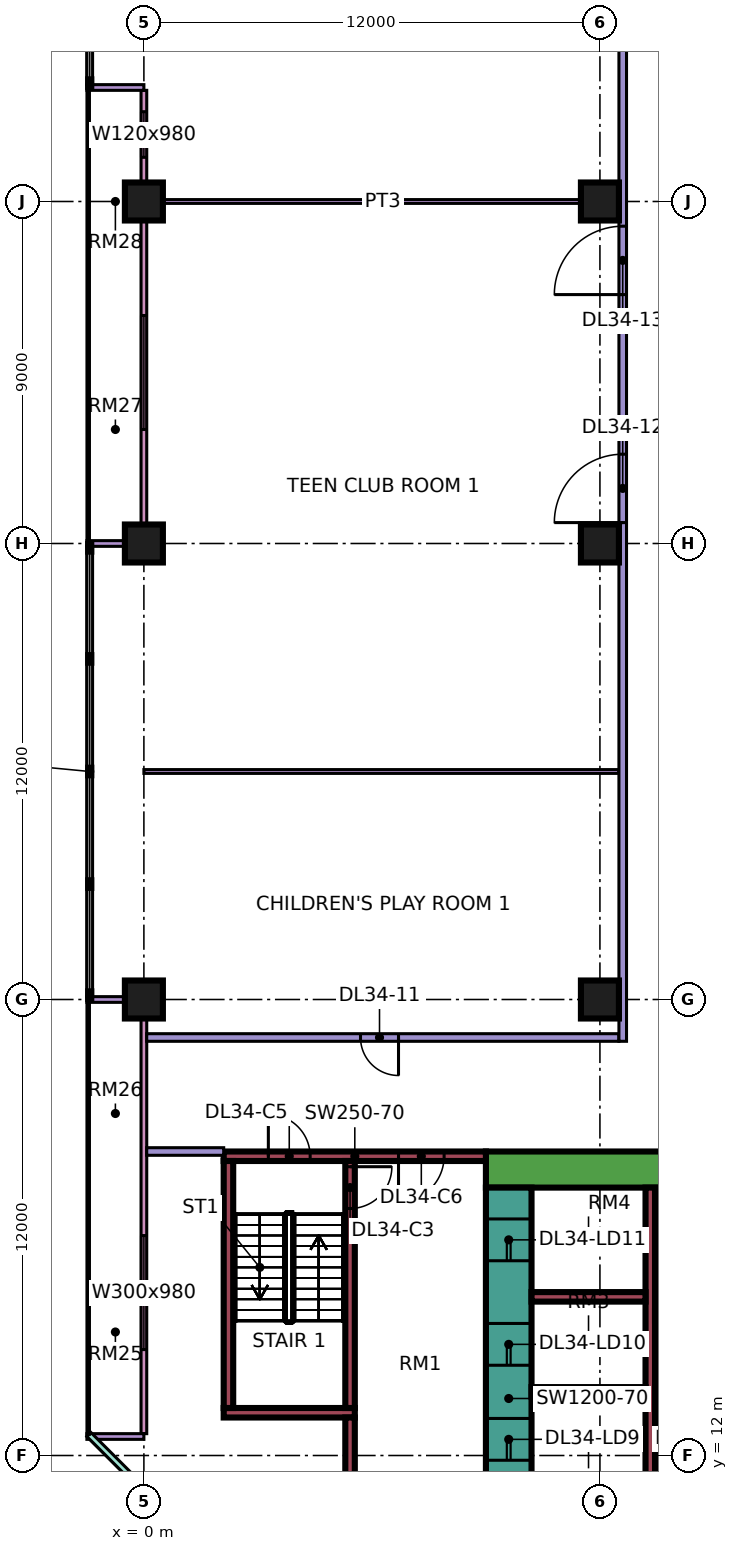
"""IFC4 building model, lengths in metres.
Left out: names, types, materials, properties, quantities, classifications, styles, units other than length and angle.
Written with IfcOpenShell. Run it as: python <this file> out.ifc"""

import sys

from ifc_helpers import new_model, si_unit, direction, frame, frame_2d, origin, origin_2d, place, context, subcontext, project, spatial, rectangle, extrude, element, fill, save


model = new_model("IFC4")
c1 = context("Model", 3, precision=1e-05, world=origin(), true_north=direction((0.0, 1.0)))
c2 = subcontext(c1, "Body", "Model", "MODEL_VIEW")
j1 = project(units=[si_unit("LENGTHUNIT", "METRE"), si_unit("PLANEANGLEUNIT", "RADIAN")], contexts=[c1])
p1 = place(None, origin())
s1 = spatial("IfcSite", under=j1, at=p1, CompositionType="ELEMENT")
p2 = place(p1, origin())
s2 = spatial("IfcBuilding", under=s1, at=p2, CompositionType="ELEMENT")
p3 = place(p2, frame((0.0, 0.0, 146.15)))
s3 = spatial("IfcBuildingStorey", under=s2, at=p3, CompositionType="ELEMENT", Elevation=146.15)
for number, where, z_axis, x_axis in (
    (1, (0.0, 24.0, 0.0), (0.0, 0.0, 1.0), (1.0, 0.0, 0.0)),
    (2, (0.0, 36.0, 0.0), (0.0, 0.0, 1.0), (1.0, 0.0, 0.0)),
    (3, (0.0, 45.0, 0.0), (0.0, 0.0, 1.0), (1.0, 0.0, 0.0)),
    (4, (12.0, 24.0, 0.0), (0.0, 0.0, 1.0), (1.0, 0.0, 0.0)),
    (5, (12.0, 36.0, 0.0), (0.0, 0.0, 1.0), (1.0, 0.0, 0.0)),
    (6, (12.0, 45.0, 0.0), (0.0, 0.0, 1.0), (1.0, 0.0, 0.0)),
):
    element("IfcColumn", number, at=place(p3, frame(where, z_axis=z_axis, x_axis=x_axis)), inside=s3, PredefinedType="COLUMN", context=c2, shape_type="SweptSolid", body=[
        extrude(rectangle(XDim=1.0, YDim=1.0, at=origin_2d()), origin(), (0.0, 0.0, 1.0), 11.25),
    ])
p4 = place(p3, frame((9.0, 19.525, 0.0), z_axis=(0.0, 0.0, 1.0), x_axis=(1.0, 0.0, 0.0)))
e7 = element("IfcWall", 7, at=p4, inside=s3, PredefinedType="SHEAR", context=c2, shape_type="SweptSolid", body=[
    extrude(rectangle(XDim=25.0, YDim=0.95, at=frame_2d((12.5, 0.0))), origin(), (0.0, 0.0, 1.0), 11.25),
])
p5 = place(p4, frame((19.1, 0.0, 0.0)))
e8 = element("IfcOpeningElement", 8, at=p5, cuts=e7, PredefinedType="OPENING", context=c2, shape_type="SweptSolid", body=[
    extrude(rectangle(XDim=1.8, YDim=2.4, at=frame_2d((0.9, 1.2))), frame((0.0, 0.485, 0.0), z_axis=(0.0, -1.0, 0.0), x_axis=(1.0, 0.0, 0.0)), (0.0, 0.0, 1.0), 0.97),
])
p6 = place(p3, frame((9.6, 7.95, 0.0), z_axis=(0.0, 0.0, 1.0), x_axis=(0.0, 1.0, 0.0)))
e9 = element("IfcWall", 9, at=p6, inside=s3, PredefinedType="SHEAR", context=c2, shape_type="SweptSolid", body=[
    extrude(rectangle(XDim=11.1, YDim=1.2, at=frame_2d((5.55, 0.0))), origin(), (0.0, 0.0, 1.0), 11.25),
])
p7 = place(p6, frame((3.925, 0.0, 0.0)))
e10 = element("IfcOpeningElement", 10, at=p7, cuts=e9, PredefinedType="OPENING", context=c2, shape_type="SweptSolid", body=[
    extrude(rectangle(XDim=1.1, YDim=2.2, at=frame_2d((0.55, 1.1))), frame((0.0, 0.61, 0.0), z_axis=(0.0, -1.0, 0.0), x_axis=(1.0, 0.0, 0.0)), (0.0, 0.0, 1.0), 1.22),
])
p8 = place(p6, frame((6.425, 0.0, 0.0)))
e11 = element("IfcOpeningElement", 11, at=p8, cuts=e9, PredefinedType="OPENING", context=c2, shape_type="SweptSolid", body=[
    extrude(rectangle(XDim=1.1, YDim=2.2, at=frame_2d((0.55, 1.1))), frame((0.0, 0.61, 0.0), z_axis=(0.0, -1.0, 0.0), x_axis=(1.0, 0.0, 0.0)), (0.0, 0.0, 1.0), 1.22),
])
p9 = place(p6, frame((9.175, 0.0, 0.0)))
e12 = element("IfcOpeningElement", 12, at=p9, cuts=e9, PredefinedType="OPENING", context=c2, shape_type="SweptSolid", body=[
    extrude(rectangle(XDim=1.1, YDim=2.2, at=frame_2d((0.55, 1.1))), frame((0.0, 0.61, 0.0), z_axis=(0.0, -1.0, 0.0), x_axis=(1.0, 0.0, 0.0)), (0.0, 0.0, 1.0), 1.22),
])
p10 = place(p6, frame((1.6, 0.0, 0.0)))
e13 = element("IfcOpeningElement", 13, at=p10, cuts=e9, PredefinedType="OPENING", context=c2, shape_type="SweptSolid", body=[
    extrude(rectangle(XDim=0.9, YDim=2.1, at=frame_2d((0.45, 1.05))), frame((0.0, 0.61, 0.0), z_axis=(0.0, -1.0, 0.0), x_axis=(1.0, 0.0, 0.0)), (0.0, 0.0, 1.0), 1.22),
])
p11 = place(p3, frame((13.325, 7.95, 0.0), z_axis=(0.0, 0.0, 1.0), x_axis=(0.0, 1.0, 0.0)))
e14 = element("IfcWall", 14, at=p11, inside=s3, PredefinedType="SHEAR", context=c2, shape_type="SweptSolid", body=[
    extrude(rectangle(XDim=11.1, YDim=0.25, at=frame_2d((5.55, 0.0))), origin(), (0.0, 0.0, 1.0), 11.25),
])
p12 = place(p3, frame((13.45, 15.675, 0.0), z_axis=(0.0, 0.0, 1.0), x_axis=(1.0, 0.0, 0.0)))
e15 = element("IfcWall", 15, at=p12, inside=s3, PredefinedType="SHEAR", context=c2, shape_type="SweptSolid", body=[
    extrude(rectangle(XDim=13.75, YDim=0.25, at=frame_2d((6.875, 0.0))), origin(), (0.0, 0.0, 1.0), 11.25),
])
p13 = place(p12, frame((11.65, 0.0, 0.0)))
e16 = element("IfcOpeningElement", 16, at=p13, cuts=e15, PredefinedType="OPENING", context=c2, shape_type="SweptSolid", body=[
    extrude(rectangle(XDim=1.2, YDim=2.2, at=frame_2d((0.6, 1.1))), frame((0.0, 0.135, 0.0), z_axis=(0.0, -1.0, 0.0), x_axis=(1.0, 0.0, 0.0)), (0.0, 0.0, 1.0), 0.27),
])
for number, where, z_axis, x_axis in (
    (17, (10.2, 13.675, 0.0), (0.0, 0.0, 1.0), (1.0, 0.0, 0.0)),
    (18, (10.2, 16.175, 0.0), (0.0, 0.0, 1.0), (1.0, 0.0, 0.0)),
):
    element("IfcWall", number, at=place(p3, frame(where, z_axis=z_axis, x_axis=x_axis)), inside=s3, PredefinedType="SHEAR", context=c2, shape_type="SweptSolid", body=[
        extrude(rectangle(XDim=3.0, YDim=0.25, at=frame_2d((1.5, 0.0))), origin(), (0.0, 0.0, 1.0), 11.25),
    ])
p14 = place(p3, frame((2.1, 19.875, 0.0), z_axis=(0.0, 0.0, 1.0), x_axis=(1.0, 0.0, 0.0)))
e19 = element("IfcWall", 19, at=p14, inside=s3, PredefinedType="SHEAR", context=c2, shape_type="SweptSolid", body=[
    extrude(rectangle(XDim=6.9, YDim=0.25, at=frame_2d((3.45, 0.0))), origin(), (0.0, 0.0, 1.0), 11.25),
])
p15 = place(p14, frame((1.175, 0.0, 0.0)))
e20 = element("IfcOpeningElement", 20, at=p15, cuts=e19, PredefinedType="OPENING", context=c2, shape_type="SweptSolid", body=[
    extrude(rectangle(XDim=1.1, YDim=2.2, at=frame_2d((0.55, 1.1))), frame((0.0, 0.135, 0.0), z_axis=(0.0, -1.0, 0.0), x_axis=(1.0, 0.0, 0.0)), (0.0, 0.0, 1.0), 0.27),
])
p16 = place(p14, frame((4.6, 0.0, 0.0)))
e21 = element("IfcOpeningElement", 21, at=p16, cuts=e19, PredefinedType="OPENING", context=c2, shape_type="SweptSolid", body=[
    extrude(rectangle(XDim=1.2, YDim=2.2, at=frame_2d((0.6, 1.1))), frame((0.0, 0.135, 0.0), z_axis=(0.0, -1.0, 0.0), x_axis=(1.0, 0.0, 0.0)), (0.0, 0.0, 1.0), 0.27),
])
p17 = place(p3, frame((2.1, 13.125, 0.0), z_axis=(0.0, 0.0, 1.0), x_axis=(1.0, 0.0, 0.0)))
e22 = element("IfcWall", 22, at=p17, inside=s3, PredefinedType="SHEAR", context=c2, shape_type="SweptSolid", body=[
    extrude(rectangle(XDim=3.45, YDim=0.25, at=frame_2d((1.725, 0.0))), origin(), (0.0, 0.0, 1.0), 11.25),
])
p18 = place(p3, frame((2.225, 13.25, 0.0), z_axis=(0.0, 0.0, 1.0), x_axis=(0.0, 1.0, 0.0)))
e23 = element("IfcWall", 23, at=p18, inside=s3, PredefinedType="SHEAR", context=c2, shape_type="SweptSolid", body=[
    extrude(rectangle(XDim=6.5, YDim=0.25, at=frame_2d((3.25, 0.0))), origin(), (0.0, 0.0, 1.0), 11.25),
])
p19 = place(p3, frame((5.425, 13.25, 0.0), z_axis=(0.0, 0.0, 1.0), x_axis=(0.0, 1.0, 0.0)))
e24 = element("IfcWall", 24, at=p19, inside=s3, PredefinedType="SHEAR", context=c2, shape_type="SweptSolid", body=[
    extrude(rectangle(XDim=6.5, YDim=0.25, at=frame_2d((3.25, 0.0))), origin(), (0.0, 0.0, 1.0), 11.25),
])
p20 = place(p19, frame((5.25, 0.0, 0.0)))
e25 = element("IfcOpeningElement", 25, at=p20, cuts=e24, PredefinedType="OPENING", context=c2, shape_type="SweptSolid", body=[
    extrude(rectangle(XDim=1.1, YDim=2.2, at=frame_2d((0.55, 1.1))), frame((0.0, 0.135, 0.0), z_axis=(0.0, -1.0, 0.0), x_axis=(1.0, 0.0, 0.0)), (0.0, 0.0, 1.0), 0.27),
])
p21 = place(p3, frame((5.425, 9.0, 0.0), z_axis=(0.0, 0.0, 1.0), x_axis=(0.0, 1.0, 0.0)))
e26 = element("IfcWall", 26, at=p21, inside=s3, PredefinedType="SHEAR", context=c2, shape_type="SweptSolid", body=[
    extrude(rectangle(XDim=4.0, YDim=0.25, at=frame_2d((2.0, 0.0))), origin(), (0.0, 0.0, 1.0), 11.25),
])
p22 = place(p3, frame((0.0, 47.925, 0.0), z_axis=(0.0, 0.0, 1.0), x_axis=(0.0, -1.0, 0.0)))
e27 = element("IfcWall", 27, at=p22, inside=s3, PredefinedType="SOLIDWALL", context=c2, shape_type="SweptSolid", body=[
    extrude(rectangle(XDim=11.85, YDim=0.15, at=frame_2d((5.925, 0.0))), origin(), (0.0, 0.0, 1.0), 10.85),
])
p23 = place(p22, frame((0.562, 0.0, 0.45)))
e28 = element("IfcOpeningElement", 28, at=p23, cuts=e27, PredefinedType="OPENING", context=c2, shape_type="SweptSolid", body=[
    extrude(rectangle(XDim=1.2, YDim=9.8, at=frame_2d((0.6, 4.9))), frame((0.0, 0.085, 0.0), z_axis=(0.0, -1.0, 0.0), x_axis=(1.0, 0.0, 0.0)), (0.0, 0.0, 1.0), 0.17),
])
p24 = place(p22, frame((5.925, 0.0, 0.45)))
e29 = element("IfcOpeningElement", 29, at=p24, cuts=e27, PredefinedType="OPENING", context=c2, shape_type="SweptSolid", body=[
    extrude(rectangle(XDim=3.0, YDim=9.8, at=frame_2d((1.5, 4.9))), frame((0.0, 0.085, 0.0), z_axis=(0.0, -1.0, 0.0), x_axis=(1.0, 0.0, 0.0)), (0.0, 0.0, 1.0), 0.17),
])
for number, where, z_axis, x_axis in (
    (30, (-1.5, 48.0, 0.0), (0.0, 0.0, 1.0), (1.0, 0.0, 0.0)),
    (31, (-1.5, 36.0, 0.0), (0.0, 0.0, 1.0), (1.0, 0.0, 0.0)),
):
    element("IfcWall", number, at=place(p3, frame(where, z_axis=z_axis, x_axis=x_axis)), inside=s3, PredefinedType="SOLIDWALL", context=c2, shape_type="SweptSolid", body=[
        extrude(rectangle(XDim=1.5, YDim=0.15, at=frame_2d((0.75, 0.0))), origin(), (0.0, 0.0, 1.0), 10.85),
    ])
p25 = place(p3, frame((0.0, 23.925, 0.0), z_axis=(0.0, 0.0, 1.0), x_axis=(0.0, -1.0, 0.0)))
e32 = element("IfcWall", 32, at=p25, inside=s3, PredefinedType="SOLIDWALL", context=c2, shape_type="SweptSolid", body=[
    extrude(rectangle(XDim=11.35, YDim=0.15, at=frame_2d((5.675, 0.0))), origin(), (0.0, 0.0, 1.0), 10.85),
])
p26 = place(p25, frame((6.137, 0.0, 0.45)))
e33 = element("IfcOpeningElement", 33, at=p26, cuts=e32, PredefinedType="OPENING", context=c2, shape_type="SweptSolid", body=[
    extrude(rectangle(XDim=3.0, YDim=9.8, at=frame_2d((1.5, 4.9))), frame((0.0, 0.085, 0.0), z_axis=(0.0, -1.0, 0.0), x_axis=(1.0, 0.0, 0.0)), (0.0, 0.0, 1.0), 0.17),
])
for number, where, z_axis, x_axis in (
    (34, (-1.5, 24.0, 0.0), (0.0, 0.0, 1.0), (1.0, 0.0, 0.0)),
    (35, (-1.5, 12.5, 0.0), (0.0, 0.0, 1.0), (1.0, 0.0, 0.0)),
):
    element("IfcWall", number, at=place(p3, frame(where, z_axis=z_axis, x_axis=x_axis)), inside=s3, PredefinedType="SOLIDWALL", context=c2, shape_type="SweptSolid", body=[
        extrude(rectangle(XDim=1.5, YDim=0.15, at=frame_2d((0.75, 0.0))), origin(), (0.0, 0.0, 1.0), 10.85),
    ])
p27 = place(p3, frame((-1.447, 12.553, 0.0), z_axis=(0.0, 0.0, 1.0), x_axis=(0.707106781187, -0.707106781187, 0.0)))
e36 = element("IfcWall", 36, at=p27, inside=s3, PredefinedType="SOLIDWALL", context=c2, shape_type="SweptSolid", body=[
    extrude(rectangle(XDim=19.799, YDim=0.15, at=frame_2d((9.899, 0.0))), origin(), (0.0, 0.0, 1.0), 10.85),
])
p28 = place(p27, frame((8.399, 0.0, 0.45)))
e37 = element("IfcOpeningElement", 37, at=p28, cuts=e36, PredefinedType="OPENING", context=c2, shape_type="SweptSolid", body=[
    extrude(rectangle(XDim=3.0, YDim=9.8, at=frame_2d((1.5, 4.9))), frame((0.0, 0.085, 0.0), z_axis=(0.0, -1.0, 0.0), x_axis=(1.0, 0.0, 0.0)), (0.0, 0.0, 1.0), 0.17),
])
p29 = place(p3, frame((0.0, 30.0, 0.0), z_axis=(0.0, 0.0, 1.0), x_axis=(1.0, 0.0, 0.0)))
e38 = element("IfcWall", 38, at=p29, inside=s3, PredefinedType="PARTITIONING", context=c2, shape_type="SweptSolid", body=[
    extrude(rectangle(XDim=12.5, YDim=0.1, at=frame_2d((6.25, 0.0))), origin(), (0.0, 0.0, 1.0), 10.85),
])
p30 = place(p3, frame((0.074, 20.0, 0.0), z_axis=(0.0, 0.0, 1.0), x_axis=(1.0, 0.0, 0.0)))
e39 = element("IfcWall", 39, at=p30, inside=s3, PredefinedType="PARTITIONING", context=c2, shape_type="SweptSolid", body=[
    extrude(rectangle(XDim=2.026, YDim=0.2, at=frame_2d((1.013, 0.0))), origin(), (0.0, 0.0, 1.0), 10.85),
])
p31 = place(p3, frame((0.074, 23.0, 0.0), z_axis=(0.0, 0.0, 1.0), x_axis=(1.0, 0.0, 0.0)))
e40 = element("IfcWall", 40, at=p31, inside=s3, PredefinedType="PARTITIONING", context=c2, shape_type="SweptSolid", body=[
    extrude(rectangle(XDim=12.426, YDim=0.2, at=frame_2d((6.213, 0.0))), origin(), (0.0, 0.0, 1.0), 10.85),
])
p32 = place(p31, frame((5.626, 0.0, 0.0)))
e41 = element("IfcOpeningElement", 41, at=p32, cuts=e40, PredefinedType="OPENING", context=c2, shape_type="SweptSolid", body=[
    extrude(rectangle(XDim=1.0, YDim=2.1, at=frame_2d((0.5, 1.05))), frame((0.0, 0.11, 0.0), z_axis=(0.0, -1.0, 0.0), x_axis=(1.0, 0.0, 0.0)), (0.0, 0.0, 1.0), 0.22),
])
p33 = place(p3, frame((0.074, 45.0, 0.0), z_axis=(0.0, 0.0, 1.0), x_axis=(1.0, 0.0, 0.0)))
e42 = element("IfcWall", 42, at=p33, inside=s3, PredefinedType="PARTITIONING", context=c2, shape_type="SweptSolid", body=[
    extrude(rectangle(XDim=12.426, YDim=0.1, at=frame_2d((6.213, 0.0))), origin(), (0.0, 0.0, 1.0), 10.85),
])
p34 = place(p3, frame((12.6, 22.9, 0.0), z_axis=(0.0, 0.0, 1.0), x_axis=(0.0, 1.0, 0.0)))
e43 = element("IfcWall", 43, at=p34, inside=s3, PredefinedType="PARTITIONING", context=c2, shape_type="SweptSolid", body=[
    extrude(rectangle(XDim=40.026, YDim=0.2, at=frame_2d((20.013, 0.0))), origin(), (0.0, 0.0, 1.0), 10.85),
])
p35 = place(p34, frame((13.65, 0.0, 0.0)))
e44 = element("IfcOpeningElement", 44, at=p35, cuts=e43, PredefinedType="OPENING", context=c2, shape_type="SweptSolid", body=[
    extrude(rectangle(XDim=1.8, YDim=2.1, at=frame_2d((0.9, 1.05))), frame((0.0, 0.11, 0.0), z_axis=(0.0, -1.0, 0.0), x_axis=(1.0, 0.0, 0.0)), (0.0, 0.0, 1.0), 0.22),
])
p36 = place(p34, frame((19.65, 0.0, 0.0)))
e45 = element("IfcOpeningElement", 45, at=p36, cuts=e43, PredefinedType="OPENING", context=c2, shape_type="SweptSolid", body=[
    extrude(rectangle(XDim=1.8, YDim=2.1, at=frame_2d((0.9, 1.05))), frame((0.0, 0.11, 0.0), z_axis=(0.0, -1.0, 0.0), x_axis=(1.0, 0.0, 0.0)), (0.0, 0.0, 1.0), 0.22),
])
p37 = place(p34, frame((26.2, 0.0, 0.0)))
e46 = element("IfcOpeningElement", 46, at=p37, cuts=e43, PredefinedType="OPENING", context=c2, shape_type="SweptSolid", body=[
    extrude(rectangle(XDim=1.0, YDim=2.1, at=frame_2d((0.5, 1.05))), frame((0.0, 0.11, 0.0), z_axis=(0.0, -1.0, 0.0), x_axis=(1.0, 0.0, 0.0)), (0.0, 0.0, 1.0), 0.22),
])
p38 = place(p34, frame((29.45, 0.0, 0.0)))
e47 = element("IfcOpeningElement", 47, at=p38, cuts=e43, PredefinedType="OPENING", context=c2, shape_type="SweptSolid", body=[
    extrude(rectangle(XDim=1.0, YDim=2.1, at=frame_2d((0.5, 1.05))), frame((0.0, 0.11, 0.0), z_axis=(0.0, -1.0, 0.0), x_axis=(1.0, 0.0, 0.0)), (0.0, 0.0, 1.0), 0.22),
])
p39 = place(p34, frame((35.2, 0.0, 0.0)))
e48 = element("IfcOpeningElement", 48, at=p39, cuts=e43, PredefinedType="OPENING", context=c2, shape_type="SweptSolid", body=[
    extrude(rectangle(XDim=1.0, YDim=2.1, at=frame_2d((0.5, 1.05))), frame((0.0, 0.11, 0.0), z_axis=(0.0, -1.0, 0.0), x_axis=(1.0, 0.0, 0.0)), (0.0, 0.0, 1.0), 0.22),
])
p40 = place(p34, frame((38.45, 0.0, 0.0)))
e49 = element("IfcOpeningElement", 49, at=p40, cuts=e43, PredefinedType="OPENING", context=c2, shape_type="SweptSolid", body=[
    extrude(rectangle(XDim=1.0, YDim=2.1, at=frame_2d((0.5, 1.05))), frame((0.0, 0.11, 0.0), z_axis=(0.0, -1.0, 0.0), x_axis=(1.0, 0.0, 0.0)), (0.0, 0.0, 1.0), 0.22),
])
p41 = place(p23, origin())
e50 = element("IfcWindow", 50, at=p41, inside=s3, PartitioningType="SINGLE_PANEL", PredefinedType="WINDOW", context=c2, shape_type="SweptSolid", body=[
    extrude(rectangle(XDim=1.2, YDim=9.8, at=frame_2d((0.6, 4.9))), frame((0.0, 0.03, 0.0), z_axis=(0.0, -1.0, 0.0), x_axis=(1.0, 0.0, 0.0)), (0.0, 0.0, 1.0), 0.06),
])
fill(e28, e50)
p42 = place(p24, origin())
e51 = element("IfcWindow", 51, at=p42, inside=s3, PartitioningType="SINGLE_PANEL", PredefinedType="WINDOW", context=c2, shape_type="SweptSolid", body=[
    extrude(rectangle(XDim=3.0, YDim=9.8, at=frame_2d((1.5, 4.9))), frame((0.0, 0.03, 0.0), z_axis=(0.0, -1.0, 0.0), x_axis=(1.0, 0.0, 0.0)), (0.0, 0.0, 1.0), 0.06),
])
fill(e29, e51)
p43 = place(p26, origin())
e52 = element("IfcWindow", 52, at=p43, inside=s3, PartitioningType="SINGLE_PANEL", PredefinedType="WINDOW", context=c2, shape_type="SweptSolid", body=[
    extrude(rectangle(XDim=3.0, YDim=9.8, at=frame_2d((1.5, 4.9))), frame((0.0, 0.03, 0.0), z_axis=(0.0, -1.0, 0.0), x_axis=(1.0, 0.0, 0.0)), (0.0, 0.0, 1.0), 0.06),
])
fill(e33, e52)
p44 = place(p7, origin())
e53 = element("IfcDoor", 53, at=p44, inside=s3, OperationType="DOUBLE_DOOR_SLIDING", PredefinedType="DOOR", context=c2, shape_type="SweptSolid", body=[
    extrude(rectangle(XDim=1.1, YDim=2.2, at=frame_2d((0.55, 1.1))), frame((0.0, 0.025, 0.0), z_axis=(0.0, -1.0, 0.0), x_axis=(1.0, 0.0, 0.0)), (0.0, 0.0, 1.0), 0.05),
])
fill(e10, e53)
p45 = place(p8, origin())
e54 = element("IfcDoor", 54, at=p45, inside=s3, OperationType="DOUBLE_DOOR_SLIDING", PredefinedType="DOOR", context=c2, shape_type="SweptSolid", body=[
    extrude(rectangle(XDim=1.1, YDim=2.2, at=frame_2d((0.55, 1.1))), frame((0.0, 0.025, 0.0), z_axis=(0.0, -1.0, 0.0), x_axis=(1.0, 0.0, 0.0)), (0.0, 0.0, 1.0), 0.05),
])
fill(e11, e54)
p46 = place(p9, origin())
e55 = element("IfcDoor", 55, at=p46, inside=s3, OperationType="DOUBLE_DOOR_SLIDING", PredefinedType="DOOR", context=c2, shape_type="SweptSolid", body=[
    extrude(rectangle(XDim=1.1, YDim=2.2, at=frame_2d((0.55, 1.1))), frame((0.0, 0.025, 0.0), z_axis=(0.0, -1.0, 0.0), x_axis=(1.0, 0.0, 0.0)), (0.0, 0.0, 1.0), 0.05),
])
fill(e12, e55)
p47 = place(p20, origin())
e56 = element("IfcDoor", 56, at=p47, inside=s3, OperationType="SINGLE_SWING_RIGHT", PredefinedType="DOOR", context=c2, shape_type="SweptSolid", body=[
    extrude(rectangle(XDim=1.1, YDim=2.2, at=frame_2d((0.55, 1.1))), frame((0.0, 0.025, 0.0), z_axis=(0.0, -1.0, 0.0), x_axis=(1.0, 0.0, 0.0)), (0.0, 0.0, 1.0), 0.05),
])
fill(e25, e56)
p48 = place(p15, origin())
e57 = element("IfcDoor", 57, at=p48, inside=s3, OperationType="SINGLE_SWING_LEFT", PredefinedType="DOOR", context=c2, shape_type="SweptSolid", body=[
    extrude(rectangle(XDim=1.1, YDim=2.2, at=frame_2d((0.55, 1.1))), frame((0.0, 0.025, 0.0), z_axis=(0.0, -1.0, 0.0), x_axis=(1.0, 0.0, 0.0)), (0.0, 0.0, 1.0), 0.05),
])
fill(e20, e57)
p49 = place(p16, frame((1.2, 0.0, 0.0), z_axis=(0.0, 0.0, 1.0), x_axis=(-1.0, 0.0, 0.0)))
e58 = element("IfcDoor", 58, at=p49, inside=s3, OperationType="SINGLE_SWING_LEFT", PredefinedType="DOOR", context=c2, shape_type="SweptSolid", body=[
    extrude(rectangle(XDim=1.2, YDim=2.2, at=frame_2d((0.6, 1.1))), frame((0.0, 0.025, 0.0), z_axis=(0.0, -1.0, 0.0), x_axis=(1.0, 0.0, 0.0)), (0.0, 0.0, 1.0), 0.05),
])
fill(e21, e58)
p50 = place(p32, origin())
e59 = element("IfcDoor", 59, at=p50, inside=s3, OperationType="SINGLE_SWING_RIGHT", PredefinedType="DOOR", context=c2, shape_type="SweptSolid", body=[
    extrude(rectangle(XDim=1.0, YDim=2.1, at=frame_2d((0.5, 1.05))), frame((0.0, 0.025, 0.0), z_axis=(0.0, -1.0, 0.0), x_axis=(1.0, 0.0, 0.0)), (0.0, 0.0, 1.0), 0.05),
])
fill(e41, e59)
p51 = place(p35, origin())
e60 = element("IfcDoor", 60, at=p51, inside=s3, OperationType="DOUBLE_DOOR_SINGLE_SWING", PredefinedType="DOOR", context=c2, shape_type="SweptSolid", body=[
    extrude(rectangle(XDim=1.8, YDim=2.1, at=frame_2d((0.9, 1.05))), frame((0.0, 0.025, 0.0), z_axis=(0.0, -1.0, 0.0), x_axis=(1.0, 0.0, 0.0)), (0.0, 0.0, 1.0), 0.05),
])
fill(e44, e60)
p52 = place(p36, origin())
e61 = element("IfcDoor", 61, at=p52, inside=s3, OperationType="DOUBLE_DOOR_SINGLE_SWING", PredefinedType="DOOR", context=c2, shape_type="SweptSolid", body=[
    extrude(rectangle(XDim=1.8, YDim=2.1, at=frame_2d((0.9, 1.05))), frame((0.0, 0.025, 0.0), z_axis=(0.0, -1.0, 0.0), x_axis=(1.0, 0.0, 0.0)), (0.0, 0.0, 1.0), 0.05),
])
fill(e45, e61)
save(model, sys.argv[1])
